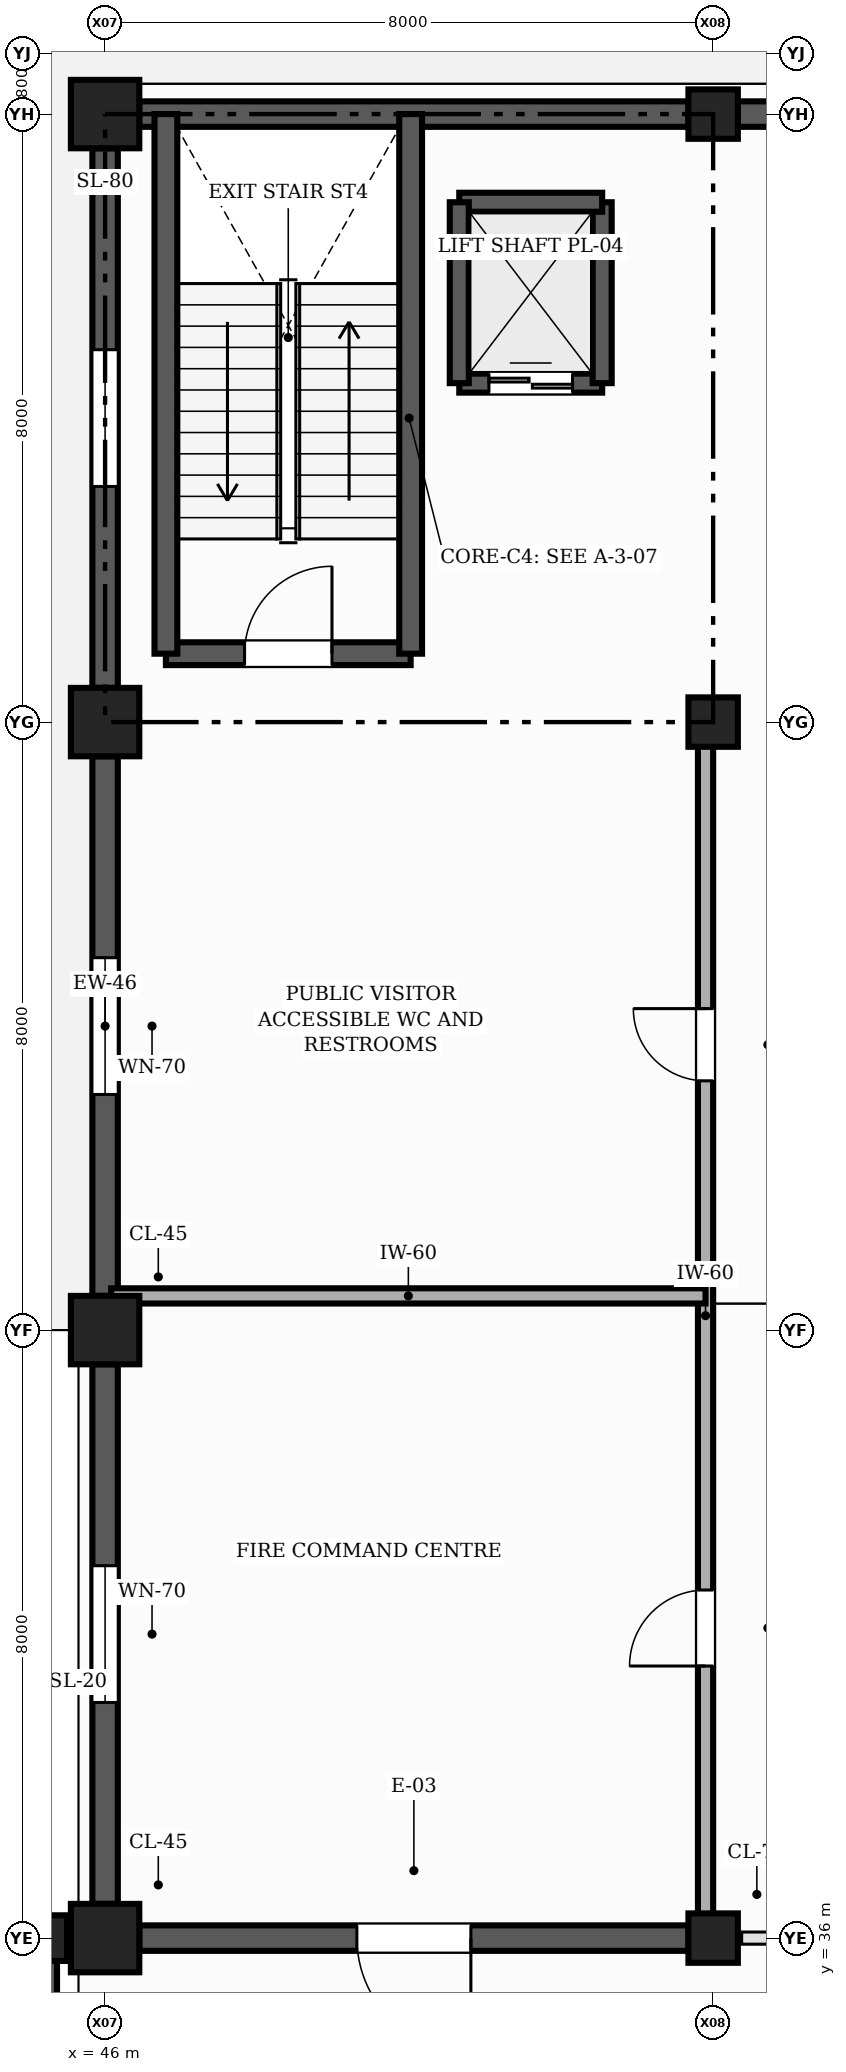
"""IFC4 building model, lengths in metres.
Left out: names, types, materials, properties, quantities, classifications, styles, units other than length and angle.
Written with IfcOpenShell. Run it as: python <this file> out.ifc"""

import sys

from ifc_helpers import new_model, si_unit, direction, frame, frame_2d, origin, origin_2d, place, context, subcontext, project, spatial, rectangle, extrude, element, fill, save


model = new_model("IFC4")
c1 = context("Model", 3, precision=1e-05, world=origin(), true_north=direction((0.0, 1.0)))
c2 = subcontext(c1, "Body", "Model", "MODEL_VIEW")
j1 = project(units=[si_unit("LENGTHUNIT", "METRE"), si_unit("PLANEANGLEUNIT", "RADIAN")], contexts=[c1])
p1 = place(None, origin())
s1 = spatial("IfcSite", under=j1, at=p1, CompositionType="ELEMENT")
p2 = place(p1, origin())
s2 = spatial("IfcBuilding", under=s1, at=p2, CompositionType="ELEMENT")
p3 = place(p2, origin())
s3 = spatial("IfcBuildingStorey", under=s2, at=p3, CompositionType="ELEMENT", Elevation=0.0)
p4 = place(p3, frame((45.2, 36.0, -0.5), z_axis=(0.0, 0.0, 1.0), x_axis=(1.0, 0.0, 0.0)))
e1 = element("IfcColumn", 1, at=p4, inside=s3, PredefinedType="COLUMN", context=c2, shape_type="SweptSolid", body=[
    extrude(rectangle(XDim=0.6, YDim=0.6, at=origin_2d()), origin(), (0.0, 0.0, 1.0), 5.3),
])
for number, where, z_axis, x_axis in (
    (2, (46.0, 36.0, 0.0), (0.0, 0.0, 1.0), (1.0, 0.0, 0.0)),
    (3, (46.0, 44.0, 0.0), (0.0, 0.0, 1.0), (1.0, 0.0, 0.0)),
    (4, (46.0, 52.0, 0.0), (0.0, 0.0, 1.0), (1.0, 0.0, 0.0)),
    (5, (46.0, 60.0, 0.0), (0.0, 0.0, 1.0), (1.0, 0.0, 0.0)),
):
    element("IfcColumn", number, at=place(p3, frame(where, z_axis=z_axis, x_axis=x_axis)), inside=s3, PredefinedType="COLUMN", context=c2, shape_type="SweptSolid", body=[
        extrude(rectangle(XDim=0.9, YDim=0.9, at=origin_2d()), origin(), (0.0, 0.0, 1.0), 4.8),
    ])
for number, where, z_axis, x_axis in (
    (6, (54.0, 36.0, 0.0), (0.0, 0.0, 1.0), (1.0, 0.0, 0.0)),
    (7, (54.0, 52.0, 0.0), (0.0, 0.0, 1.0), (1.0, 0.0, 0.0)),
    (8, (54.0, 60.0, 0.0), (0.0, 0.0, 1.0), (1.0, 0.0, 0.0)),
):
    element("IfcColumn", number, at=place(p3, frame(where, z_axis=z_axis, x_axis=x_axis)), inside=s3, PredefinedType="COLUMN", context=c2, shape_type="SweptSolid", body=[
        extrude(rectangle(XDim=0.65, YDim=0.65, at=origin_2d()), origin(), (0.0, 0.0, 1.0), 4.8),
    ])
p5 = place(p3, frame((46.45, 36.0, -0.42), z_axis=(0.0, 0.0, 1.0), x_axis=(1.0, 0.0, 0.0)))
e9 = element("IfcWall", 9, at=p5, inside=s3, PredefinedType="SOLIDWALL", context=c2, shape_type="SweptSolid", body=[
    extrude(rectangle(XDim=7.225, YDim=0.335, at=frame_2d((3.613, 0.0))), origin(), (0.0, 0.0, 1.0), 4.2),
])
p6 = place(p5, frame((2.863, 0.0, 0.42)))
e10 = element("IfcOpeningElement", 10, at=p6, cuts=e9, PredefinedType="OPENING", context=c2, shape_type="SweptSolid", body=[
    extrude(rectangle(XDim=1.5, YDim=2.2, at=frame_2d((0.75, 1.1))), frame((0.0, 0.177, 0.0), z_axis=(0.0, -1.0, 0.0), x_axis=(1.0, 0.0, 0.0)), (0.0, 0.0, 1.0), 0.355),
])
p7 = place(p3, frame((61.55, 60.0, 0.0), z_axis=(0.0, 0.0, 1.0), x_axis=(-1.0, 0.0, 0.0)))
e11 = element("IfcWall", 11, at=p7, inside=s3, PredefinedType="SOLIDWALL", context=c2, shape_type="SweptSolid", body=[
    extrude(rectangle(XDim=7.225, YDim=0.335, at=frame_2d((3.613, 0.0))), origin(), (0.0, 0.0, 1.0), 3.78),
])
p8 = place(p7, frame((2.812, 0.0, 0.9)))
e12 = element("IfcOpeningElement", 12, at=p8, cuts=e11, PredefinedType="OPENING", context=c2, shape_type="SweptSolid", body=[
    extrude(rectangle(XDim=1.6, YDim=2.1, at=frame_2d((0.8, 1.05))), frame((0.0, 0.177, 0.0), z_axis=(0.0, -1.0, 0.0), x_axis=(1.0, 0.0, 0.0)), (0.0, 0.0, 1.0), 0.355),
])
p9 = place(p3, frame((53.675, 60.0, 0.0), z_axis=(0.0, 0.0, 1.0), x_axis=(-1.0, 0.0, 0.0)))
e13 = element("IfcWall", 13, at=p9, inside=s3, PredefinedType="SOLIDWALL", context=c2, shape_type="SweptSolid", body=[
    extrude(rectangle(XDim=7.225, YDim=0.335, at=frame_2d((3.613, 0.0))), origin(), (0.0, 0.0, 1.0), 4.53),
])
p10 = place(p3, frame((46.0, 59.55, 0.0), z_axis=(0.0, 0.0, 1.0), x_axis=(0.0, -1.0, 0.0)))
e14 = element("IfcWall", 14, at=p10, inside=s3, PredefinedType="SOLIDWALL", context=c2, shape_type="SweptSolid", body=[
    extrude(rectangle(XDim=7.1, YDim=0.335, at=frame_2d((3.55, 0.0))), origin(), (0.0, 0.0, 1.0), 3.88),
])
p11 = place(p10, frame((2.65, 0.0, 0.9)))
e15 = element("IfcOpeningElement", 15, at=p11, cuts=e14, PredefinedType="OPENING", context=c2, shape_type="SweptSolid", body=[
    extrude(rectangle(XDim=1.8, YDim=1.4, at=frame_2d((0.9, 0.7))), frame((0.0, 0.177, 0.0), z_axis=(0.0, -1.0, 0.0), x_axis=(1.0, 0.0, 0.0)), (0.0, 0.0, 1.0), 0.355),
])
p12 = place(p3, frame((46.0, 51.55, 0.0), z_axis=(0.0, 0.0, 1.0), x_axis=(0.0, -1.0, 0.0)))
e16 = element("IfcWall", 16, at=p12, inside=s3, PredefinedType="SOLIDWALL", context=c2, shape_type="SweptSolid", body=[
    extrude(rectangle(XDim=7.1, YDim=0.335, at=frame_2d((3.55, 0.0))), origin(), (0.0, 0.0, 1.0), 3.88),
])
p13 = place(p12, frame((2.65, 0.0, 0.9)))
e17 = element("IfcOpeningElement", 17, at=p13, cuts=e16, PredefinedType="OPENING", context=c2, shape_type="SweptSolid", body=[
    extrude(rectangle(XDim=1.8, YDim=1.4, at=frame_2d((0.9, 0.7))), frame((0.0, 0.177, 0.0), z_axis=(0.0, -1.0, 0.0), x_axis=(1.0, 0.0, 0.0)), (0.0, 0.0, 1.0), 0.355),
])
p14 = place(p3, frame((46.0, 43.55, -0.42), z_axis=(0.0, 0.0, 1.0), x_axis=(0.0, -1.0, 0.0)))
e18 = element("IfcWall", 18, at=p14, inside=s3, PredefinedType="SOLIDWALL", context=c2, shape_type="SweptSolid", body=[
    extrude(rectangle(XDim=7.1, YDim=0.335, at=frame_2d((3.55, 0.0))), origin(), (0.0, 0.0, 1.0), 4.3),
])
p15 = place(p14, frame((2.65, 0.0, 1.32)))
e19 = element("IfcOpeningElement", 19, at=p15, cuts=e18, PredefinedType="OPENING", context=c2, shape_type="SweptSolid", body=[
    extrude(rectangle(XDim=1.8, YDim=1.4, at=frame_2d((0.9, 0.7))), frame((0.0, 0.177, 0.0), z_axis=(0.0, -1.0, 0.0), x_axis=(1.0, 0.0, 0.0)), (0.0, 0.0, 1.0), 0.355),
])
p16 = place(p3, frame((45.2, 28.3, -0.42), z_axis=(0.0, 0.0, 1.0), x_axis=(0.0, 1.0, 0.0)))
e20 = element("IfcWall", 20, at=p16, inside=s3, PredefinedType="SOLIDWALL", context=c2, shape_type="SweptSolid", body=[
    extrude(rectangle(XDim=7.4, YDim=0.335, at=frame_2d((3.7, 0.0))), origin(), (0.0, 0.0, 1.0), 4.3),
])
p17 = place(p3, frame((46.8, 52.9, 0.0), z_axis=(0.0, 0.0, 1.0), x_axis=(1.0, 0.0, 0.0)))
e21 = element("IfcWall", 21, at=p17, inside=s3, PredefinedType="SHEAR", context=c2, shape_type="SweptSolid", body=[
    extrude(rectangle(XDim=3.22, YDim=0.3, at=frame_2d((1.61, 0.0))), origin(), (0.0, 0.0, 1.0), 4.8),
])
p18 = place(p17, frame((1.035, 0.0, 0.0)))
e22 = element("IfcOpeningElement", 22, at=p18, cuts=e21, PredefinedType="OPENING", context=c2, shape_type="SweptSolid", body=[
    extrude(rectangle(XDim=1.15, YDim=2.15, at=frame_2d((0.575, 1.075))), frame((0.0, 0.16, 0.0), z_axis=(0.0, -1.0, 0.0), x_axis=(1.0, 0.0, 0.0)), (0.0, 0.0, 1.0), 0.32),
])
for number, where, z_axis, x_axis in (
    (23, (50.02, 52.9, 0.0), (0.0, 0.0, 1.0), (0.0, 1.0, 0.0)),
    (24, (46.8, 60.0, 0.0), (0.0, 0.0, 1.0), (0.0, -1.0, 0.0)),
):
    element("IfcWall", number, at=place(p3, frame(where, z_axis=z_axis, x_axis=x_axis)), inside=s3, PredefinedType="SHEAR", context=c2, shape_type="SweptSolid", body=[
        extrude(rectangle(XDim=7.1, YDim=0.3, at=frame_2d((3.55, 0.0))), origin(), (0.0, 0.0, 1.0), 4.8),
    ])
p19 = place(p3, frame((50.66, 56.46, -0.5), z_axis=(0.0, 0.0, 1.0), x_axis=(1.0, 0.0, 0.0)))
e25 = element("IfcWall", 25, at=p19, inside=s3, PredefinedType="SHEAR", context=c2, shape_type="SweptSolid", body=[
    extrude(rectangle(XDim=1.88, YDim=0.25, at=frame_2d((0.94, 0.0))), origin(), (0.0, 0.0, 1.0), 5.3),
])
p20 = place(p19, frame((0.39, 0.0, 0.5)))
e26 = element("IfcOpeningElement", 26, at=p20, cuts=e25, PredefinedType="OPENING", context=c2, shape_type="SweptSolid", body=[
    extrude(rectangle(XDim=1.1, YDim=2.2, at=frame_2d((0.55, 1.1))), frame((0.0, 0.135, 0.0), z_axis=(0.0, -1.0, 0.0), x_axis=(1.0, 0.0, 0.0)), (0.0, 0.0, 1.0), 0.27),
])
p21 = place(p3, frame((52.54, 56.46, -0.5), z_axis=(0.0, 0.0, 1.0), x_axis=(0.0, 1.0, 0.0)))
e27 = element("IfcWall", 27, at=p21, inside=s3, PredefinedType="SHEAR", context=c2, shape_type="SweptSolid", body=[
    extrude(rectangle(XDim=2.38, YDim=0.25, at=frame_2d((1.19, 0.0))), origin(), (0.0, 0.0, 1.0), 5.3),
])
p22 = place(p3, frame((52.54, 58.84, -0.5), z_axis=(0.0, 0.0, 1.0), x_axis=(-1.0, 0.0, 0.0)))
e28 = element("IfcWall", 28, at=p22, inside=s3, PredefinedType="SHEAR", context=c2, shape_type="SweptSolid", body=[
    extrude(rectangle(XDim=1.88, YDim=0.25, at=frame_2d((0.94, 0.0))), origin(), (0.0, 0.0, 1.0), 5.3),
])
p23 = place(p3, frame((50.66, 58.84, -0.5), z_axis=(0.0, 0.0, 1.0), x_axis=(0.0, -1.0, 0.0)))
e29 = element("IfcWall", 29, at=p23, inside=s3, PredefinedType="SHEAR", context=c2, shape_type="SweptSolid", body=[
    extrude(rectangle(XDim=2.38, YDim=0.25, at=frame_2d((1.19, 0.0))), origin(), (0.0, 0.0, 1.0), 5.3),
])
p24 = place(p3, frame((53.9, 36.08, 0.0), z_axis=(0.0, 0.0, 1.0), x_axis=(0.0, 1.0, 0.0)))
e30 = element("IfcWall", 30, at=p24, inside=s3, PredefinedType="PARTITIONING", context=c2, shape_type="SweptSolid", body=[
    extrude(rectangle(XDim=16.22, YDim=0.2, at=frame_2d((8.11, 0.0))), origin(), (0.0, 0.0, 1.0), 3.565),
])
p25 = place(p24, frame((3.5, 0.0, 0.0)))
e31 = element("IfcOpeningElement", 31, at=p25, cuts=e30, PredefinedType="OPENING", context=c2, shape_type="SweptSolid", body=[
    extrude(rectangle(XDim=1.0, YDim=2.15, at=frame_2d((0.5, 1.075))), frame((0.0, 0.11, 0.0), z_axis=(0.0, -1.0, 0.0), x_axis=(1.0, 0.0, 0.0)), (0.0, 0.0, 1.0), 0.22),
])
p26 = place(p24, frame((11.2, 0.0, 0.0)))
e32 = element("IfcOpeningElement", 32, at=p26, cuts=e30, PredefinedType="OPENING", context=c2, shape_type="SweptSolid", body=[
    extrude(rectangle(XDim=0.95, YDim=2.15, at=frame_2d((0.475, 1.075))), frame((0.0, 0.11, 0.0), z_axis=(0.0, -1.0, 0.0), x_axis=(1.0, 0.0, 0.0)), (0.0, 0.0, 1.0), 0.22),
])
p27 = place(p3, frame((46.08, 44.45, 0.0), z_axis=(0.0, 0.0, 1.0), x_axis=(1.0, 0.0, 0.0)))
e33 = element("IfcWall", 33, at=p27, inside=s3, PredefinedType="PARTITIONING", context=c2, shape_type="SweptSolid", body=[
    extrude(rectangle(XDim=7.82, YDim=0.2, at=frame_2d((3.91, 0.0))), origin(), (0.0, 0.0, 1.0), 3.565),
])
p28 = place(p6, frame((1.5, 0.0, 0.0), z_axis=(0.0, 0.0, 1.0), x_axis=(-1.0, 0.0, 0.0)))
e34 = element("IfcDoor", 34, at=p28, inside=s3, OperationType="SINGLE_SWING_LEFT", PredefinedType="DOOR", context=c2, shape_type="SweptSolid", body=[
    extrude(rectangle(XDim=1.5, YDim=2.2, at=frame_2d((0.75, 1.1))), frame((0.0, 0.025, 0.0), z_axis=(0.0, -1.0, 0.0), x_axis=(1.0, 0.0, 0.0)), (0.0, 0.0, 1.0), 0.05),
])
fill(e10, e34)
p29 = place(p11, origin())
e35 = element("IfcWindow", 35, at=p29, inside=s3, PartitioningType="SINGLE_PANEL", PredefinedType="WINDOW", context=c2, shape_type="SweptSolid", body=[
    extrude(rectangle(XDim=1.8, YDim=1.4, at=frame_2d((0.9, 0.7))), frame((0.0, 0.03, 0.0), z_axis=(0.0, -1.0, 0.0), x_axis=(1.0, 0.0, 0.0)), (0.0, 0.0, 1.0), 0.06),
])
fill(e15, e35)
p30 = place(p13, origin())
e36 = element("IfcWindow", 36, at=p30, inside=s3, PartitioningType="SINGLE_PANEL", PredefinedType="WINDOW", context=c2, shape_type="SweptSolid", body=[
    extrude(rectangle(XDim=1.8, YDim=1.4, at=frame_2d((0.9, 0.7))), frame((0.0, 0.03, 0.0), z_axis=(0.0, -1.0, 0.0), x_axis=(1.0, 0.0, 0.0)), (0.0, 0.0, 1.0), 0.06),
])
fill(e17, e36)
p31 = place(p15, origin())
e37 = element("IfcWindow", 37, at=p31, inside=s3, PartitioningType="SINGLE_PANEL", PredefinedType="WINDOW", context=c2, shape_type="SweptSolid", body=[
    extrude(rectangle(XDim=1.8, YDim=1.4, at=frame_2d((0.9, 0.7))), frame((0.0, 0.03, 0.0), z_axis=(0.0, -1.0, 0.0), x_axis=(1.0, 0.0, 0.0)), (0.0, 0.0, 1.0), 0.06),
])
fill(e19, e37)
p32 = place(p18, origin())
e38 = element("IfcDoor", 38, at=p32, inside=s3, OperationType="SINGLE_SWING_RIGHT", PredefinedType="DOOR", context=c2, shape_type="SweptSolid", body=[
    extrude(rectangle(XDim=1.15, YDim=2.15, at=frame_2d((0.575, 1.075))), frame((0.0, 0.025, 0.0), z_axis=(0.0, -1.0, 0.0), x_axis=(1.0, 0.0, 0.0)), (0.0, 0.0, 1.0), 0.05),
])
fill(e22, e38)
p33 = place(p20, origin())
e39 = element("IfcDoor", 39, at=p33, inside=s3, OperationType="DOUBLE_DOOR_SLIDING", PredefinedType="DOOR", context=c2, shape_type="SweptSolid", body=[
    extrude(rectangle(XDim=1.1, YDim=2.2, at=frame_2d((0.55, 1.1))), frame((0.0, 0.025, 0.0), z_axis=(0.0, -1.0, 0.0), x_axis=(1.0, 0.0, 0.0)), (0.0, 0.0, 1.0), 0.05),
])
fill(e26, e39)
p34 = place(p25, origin())
e40 = element("IfcDoor", 40, at=p34, inside=s3, OperationType="SINGLE_SWING_LEFT", PredefinedType="DOOR", context=c2, shape_type="SweptSolid", body=[
    extrude(rectangle(XDim=1.0, YDim=2.15, at=frame_2d((0.5, 1.075))), frame((0.0, 0.025, 0.0), z_axis=(0.0, -1.0, 0.0), x_axis=(1.0, 0.0, 0.0)), (0.0, 0.0, 1.0), 0.05),
])
fill(e31, e40)
p35 = place(p26, origin())
e41 = element("IfcDoor", 41, at=p35, inside=s3, OperationType="SINGLE_SWING_RIGHT", PredefinedType="DOOR", context=c2, shape_type="SweptSolid", body=[
    extrude(rectangle(XDim=0.95, YDim=2.15, at=frame_2d((0.475, 1.075))), frame((0.0, 0.025, 0.0), z_axis=(0.0, -1.0, 0.0), x_axis=(1.0, 0.0, 0.0)), (0.0, 0.0, 1.0), 0.05),
])
fill(e32, e41)
save(model, sys.argv[1])
